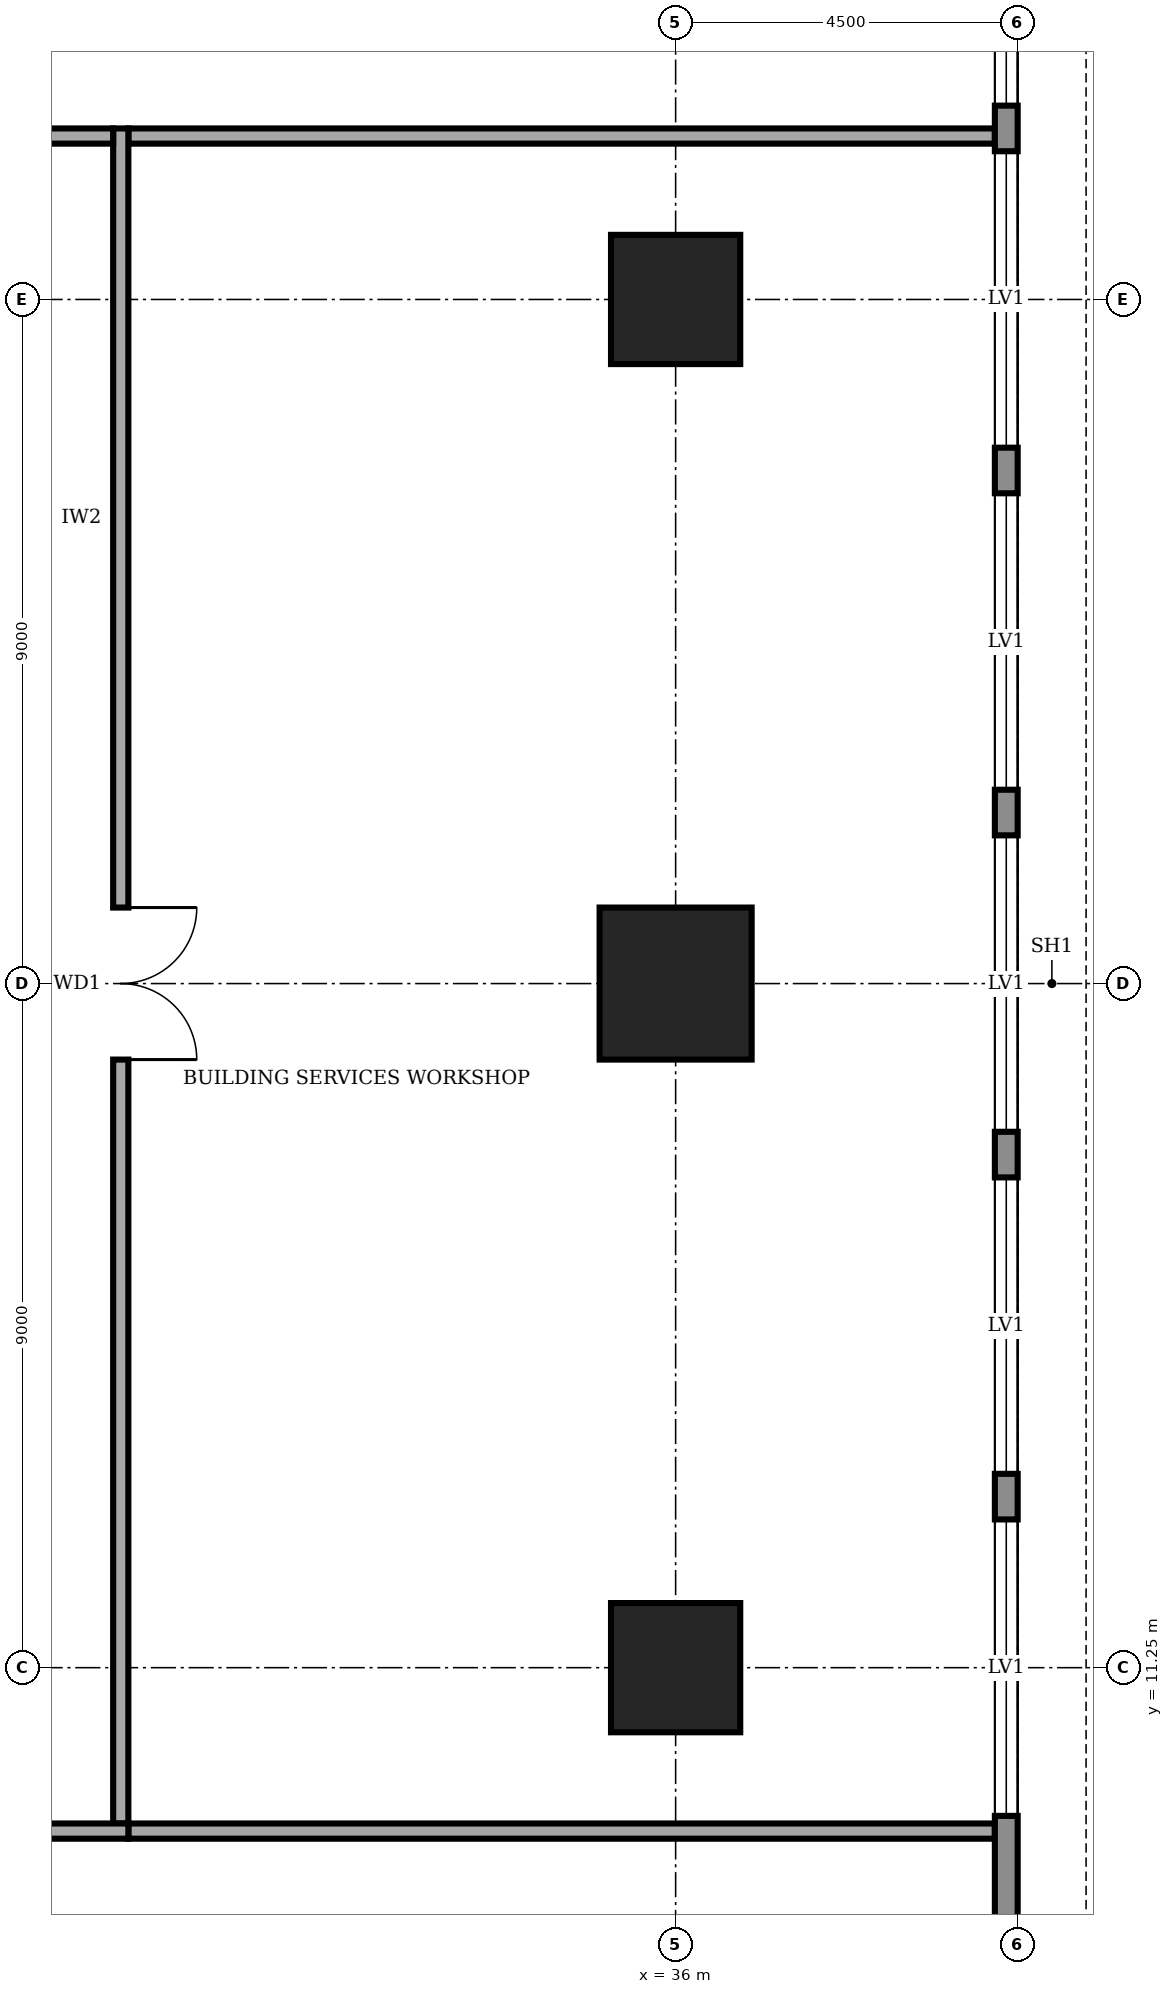
"""IFC4 building model, lengths in metres.
Left out: names, types, materials, properties, quantities, classifications, styles, units other than length and angle.
Written with IfcOpenShell. Run it as: python <this file> out.ifc"""

import sys

from ifc_helpers import new_model, si_unit, direction, frame, frame_2d, origin, origin_2d, place, context, subcontext, project, spatial, rectangle, extrude, element, fill, save


model = new_model("IFC4")
c1 = context("Model", 3, precision=1e-05, world=origin(), true_north=direction((0.0, 1.0)))
c2 = subcontext(c1, "Body", "Model", "MODEL_VIEW")
j1 = project(units=[si_unit("LENGTHUNIT", "METRE"), si_unit("PLANEANGLEUNIT", "RADIAN")], contexts=[c1])
p1 = place(None, origin())
s1 = spatial("IfcSite", under=j1, at=p1, CompositionType="ELEMENT")
p2 = place(p1, origin())
s2 = spatial("IfcBuilding", under=s1, at=p2, CompositionType="ELEMENT")
p3 = place(p2, frame((0.0, 0.0, 289.0)))
s3 = spatial("IfcBuildingStorey", under=s2, at=p3, CompositionType="ELEMENT", Elevation=289.0)
p4 = place(p3, frame((36.0, 11.25, 0.0), z_axis=(0.0, 0.0, 1.0), x_axis=(1.0, 0.0, 0.0)))
e1 = element("IfcColumn", 1, at=p4, inside=s3, PredefinedType="COLUMN", context=c2, shape_type="SweptSolid", body=[
    extrude(rectangle(XDim=1.7, YDim=1.7, at=origin_2d()), origin(), (0.0, 0.0, 1.0), 4.0),
])
p5 = place(p3, frame((36.0, 20.25, 0.0), z_axis=(0.0, 0.0, 1.0), x_axis=(1.0, 0.0, 0.0)))
e2 = element("IfcColumn", 2, at=p5, inside=s3, PredefinedType="COLUMN", context=c2, shape_type="SweptSolid", body=[
    extrude(rectangle(XDim=2.0, YDim=2.0, at=origin_2d()), origin(), (0.0, 0.0, 1.0), 4.0),
])
p6 = place(p3, frame((36.0, 29.25, 0.0), z_axis=(0.0, 0.0, 1.0), x_axis=(1.0, 0.0, 0.0)))
e3 = element("IfcColumn", 3, at=p6, inside=s3, PredefinedType="COLUMN", context=c2, shape_type="SweptSolid", body=[
    extrude(rectangle(XDim=1.7, YDim=1.7, at=origin_2d()), origin(), (0.0, 0.0, 1.0), 4.0),
])
p7 = place(p3, frame((40.35, 4.52, 0.0), z_axis=(0.0, 0.0, 1.0), x_axis=(0.0, 1.0, 0.0)))
e4 = element("IfcWall", 4, at=p7, inside=s3, PredefinedType="STANDARD", context=c2, shape_type="SweptSolid", body=[
    extrude(rectangle(XDim=31.46, YDim=0.3, at=frame_2d((15.73, 0.0))), origin(), (0.0, 0.0, 1.0), 3.75),
])
p8 = place(p7, frame((4.78, 0.0, 0.9)))
e5 = element("IfcOpeningElement", 5, at=p8, cuts=e4, PredefinedType="OPENING", context=c2, shape_type="SweptSolid", body=[
    extrude(rectangle(XDim=3.9, YDim=2.2, at=frame_2d((1.95, 1.1))), frame((0.0, 0.16, 0.0), z_axis=(0.0, -1.0, 0.0), x_axis=(1.0, 0.0, 0.0)), (0.0, 0.0, 1.0), 0.32),
])
p9 = place(p7, frame((9.28, 0.0, 0.9)))
e6 = element("IfcOpeningElement", 6, at=p9, cuts=e4, PredefinedType="OPENING", context=c2, shape_type="SweptSolid", body=[
    extrude(rectangle(XDim=3.9, YDim=2.2, at=frame_2d((1.95, 1.1))), frame((0.0, 0.16, 0.0), z_axis=(0.0, -1.0, 0.0), x_axis=(1.0, 0.0, 0.0)), (0.0, 0.0, 1.0), 0.32),
])
p10 = place(p7, frame((13.78, 0.0, 0.9)))
e7 = element("IfcOpeningElement", 7, at=p10, cuts=e4, PredefinedType="OPENING", context=c2, shape_type="SweptSolid", body=[
    extrude(rectangle(XDim=3.9, YDim=2.2, at=frame_2d((1.95, 1.1))), frame((0.0, 0.16, 0.0), z_axis=(0.0, -1.0, 0.0), x_axis=(1.0, 0.0, 0.0)), (0.0, 0.0, 1.0), 0.32),
])
p11 = place(p7, frame((18.28, 0.0, 0.9)))
e8 = element("IfcOpeningElement", 8, at=p11, cuts=e4, PredefinedType="OPENING", context=c2, shape_type="SweptSolid", body=[
    extrude(rectangle(XDim=3.9, YDim=2.2, at=frame_2d((1.95, 1.1))), frame((0.0, 0.16, 0.0), z_axis=(0.0, -1.0, 0.0), x_axis=(1.0, 0.0, 0.0)), (0.0, 0.0, 1.0), 0.32),
])
p12 = place(p7, frame((22.78, 0.0, 0.9)))
e9 = element("IfcOpeningElement", 9, at=p12, cuts=e4, PredefinedType="OPENING", context=c2, shape_type="SweptSolid", body=[
    extrude(rectangle(XDim=3.9, YDim=2.2, at=frame_2d((1.95, 1.1))), frame((0.0, 0.16, 0.0), z_axis=(0.0, -1.0, 0.0), x_axis=(1.0, 0.0, 0.0)), (0.0, 0.0, 1.0), 0.32),
])
p13 = place(p7, frame((27.28, 0.0, 0.9)))
e10 = element("IfcOpeningElement", 10, at=p13, cuts=e4, PredefinedType="OPENING", context=c2, shape_type="SweptSolid", body=[
    extrude(rectangle(XDim=3.9, YDim=2.2, at=frame_2d((1.95, 1.1))), frame((0.0, 0.16, 0.0), z_axis=(0.0, -1.0, 0.0), x_axis=(1.0, 0.0, 0.0)), (0.0, 0.0, 1.0), 0.32),
])
p14 = place(p3, frame((11.9, 9.1, 0.0), z_axis=(0.0, 0.0, 1.0), x_axis=(1.0, 0.0, 0.0)))
e11 = element("IfcWall", 11, at=p14, inside=s3, PredefinedType="SOLIDWALL", context=c2, shape_type="SweptSolid", body=[
    extrude(rectangle(XDim=16.9, YDim=0.2, at=frame_2d((8.45, 0.0))), origin(), (0.0, 0.0, 1.0), 3.75),
])
p15 = place(p14, frame((7.15, 0.0, 0.0)))
e12 = element("IfcOpeningElement", 12, at=p15, cuts=e11, PredefinedType="OPENING", context=c2, shape_type="SweptSolid", body=[
    extrude(rectangle(XDim=2.4, YDim=2.7, at=frame_2d((1.2, 1.35))), frame((0.0, 0.11, 0.0), z_axis=(0.0, -1.0, 0.0), x_axis=(1.0, 0.0, 0.0)), (0.0, 0.0, 1.0), 0.22),
])
p16 = place(p3, frame((28.7, 9.2, 0.0), z_axis=(0.0, 0.0, 1.0), x_axis=(0.0, 1.0, 0.0)))
e13 = element("IfcWall", 13, at=p16, inside=s3, PredefinedType="SOLIDWALL", context=c2, shape_type="SweptSolid", body=[
    extrude(rectangle(XDim=22.3, YDim=0.2, at=frame_2d((11.15, 0.0))), origin(), (0.0, 0.0, 1.0), 3.75),
])
p17 = place(p16, frame((10.05, 0.0, 0.0)))
e14 = element("IfcOpeningElement", 14, at=p17, cuts=e13, PredefinedType="OPENING", context=c2, shape_type="SweptSolid", body=[
    extrude(rectangle(XDim=2.0, YDim=2.1, at=frame_2d((1.0, 1.05))), frame((0.0, 0.11, 0.0), z_axis=(0.0, -1.0, 0.0), x_axis=(1.0, 0.0, 0.0)), (0.0, 0.0, 1.0), 0.22),
])
p18 = place(p3, frame((28.6, 31.4, 0.0), z_axis=(0.0, 0.0, 1.0), x_axis=(-1.0, 0.0, 0.0)))
e15 = element("IfcWall", 15, at=p18, inside=s3, PredefinedType="SOLIDWALL", context=c2, shape_type="SweptSolid", body=[
    extrude(rectangle(XDim=16.9, YDim=0.2, at=frame_2d((8.45, 0.0))), origin(), (0.0, 0.0, 1.0), 3.75),
])
p19 = place(p18, frame((12.55, 0.0, 0.0)))
e16 = element("IfcOpeningElement", 16, at=p19, cuts=e15, PredefinedType="OPENING", context=c2, shape_type="SweptSolid", body=[
    extrude(rectangle(XDim=2.4, YDim=2.7, at=frame_2d((1.2, 1.35))), frame((0.0, 0.11, 0.0), z_axis=(0.0, -1.0, 0.0), x_axis=(1.0, 0.0, 0.0)), (0.0, 0.0, 1.0), 0.22),
])
p20 = place(p18, frame((4.3, 0.0, 0.0)))
e17 = element("IfcOpeningElement", 17, at=p20, cuts=e15, PredefinedType="OPENING", context=c2, shape_type="SweptSolid", body=[
    extrude(rectangle(XDim=1.8, YDim=2.1, at=frame_2d((0.9, 1.05))), frame((0.0, 0.11, 0.0), z_axis=(0.0, -1.0, 0.0), x_axis=(1.0, 0.0, 0.0)), (0.0, 0.0, 1.0), 0.22),
])
for number, where, z_axis, x_axis in (
    (18, (28.8, 9.1, 0.0), (0.0, 0.0, 1.0), (1.0, 0.0, 0.0)),
    (19, (28.8, 31.4, 0.0), (0.0, 0.0, 1.0), (1.0, 0.0, 0.0)),
):
    element("IfcWall", number, at=place(p3, frame(where, z_axis=z_axis, x_axis=x_axis)), inside=s3, PredefinedType="SOLIDWALL", context=c2, shape_type="SweptSolid", body=[
        extrude(rectangle(XDim=11.4, YDim=0.2, at=frame_2d((5.7, 0.0))), origin(), (0.0, 0.0, 1.0), 3.75),
    ])
p21 = place(p8, origin())
e20 = element("IfcWindow", 20, at=p21, inside=s3, PartitioningType="SINGLE_PANEL", PredefinedType="WINDOW", context=c2, shape_type="SweptSolid", body=[
    extrude(rectangle(XDim=3.9, YDim=2.2, at=frame_2d((1.95, 1.1))), frame((0.0, 0.03, 0.0), z_axis=(0.0, -1.0, 0.0), x_axis=(1.0, 0.0, 0.0)), (0.0, 0.0, 1.0), 0.06),
])
fill(e5, e20)
p22 = place(p9, origin())
e21 = element("IfcWindow", 21, at=p22, inside=s3, PartitioningType="SINGLE_PANEL", PredefinedType="WINDOW", context=c2, shape_type="SweptSolid", body=[
    extrude(rectangle(XDim=3.9, YDim=2.2, at=frame_2d((1.95, 1.1))), frame((0.0, 0.03, 0.0), z_axis=(0.0, -1.0, 0.0), x_axis=(1.0, 0.0, 0.0)), (0.0, 0.0, 1.0), 0.06),
])
fill(e6, e21)
p23 = place(p10, origin())
e22 = element("IfcWindow", 22, at=p23, inside=s3, PartitioningType="SINGLE_PANEL", PredefinedType="WINDOW", context=c2, shape_type="SweptSolid", body=[
    extrude(rectangle(XDim=3.9, YDim=2.2, at=frame_2d((1.95, 1.1))), frame((0.0, 0.03, 0.0), z_axis=(0.0, -1.0, 0.0), x_axis=(1.0, 0.0, 0.0)), (0.0, 0.0, 1.0), 0.06),
])
fill(e7, e22)
p24 = place(p11, origin())
e23 = element("IfcWindow", 23, at=p24, inside=s3, PartitioningType="SINGLE_PANEL", PredefinedType="WINDOW", context=c2, shape_type="SweptSolid", body=[
    extrude(rectangle(XDim=3.9, YDim=2.2, at=frame_2d((1.95, 1.1))), frame((0.0, 0.03, 0.0), z_axis=(0.0, -1.0, 0.0), x_axis=(1.0, 0.0, 0.0)), (0.0, 0.0, 1.0), 0.06),
])
fill(e8, e23)
p25 = place(p12, origin())
e24 = element("IfcWindow", 24, at=p25, inside=s3, PartitioningType="SINGLE_PANEL", PredefinedType="WINDOW", context=c2, shape_type="SweptSolid", body=[
    extrude(rectangle(XDim=3.9, YDim=2.2, at=frame_2d((1.95, 1.1))), frame((0.0, 0.03, 0.0), z_axis=(0.0, -1.0, 0.0), x_axis=(1.0, 0.0, 0.0)), (0.0, 0.0, 1.0), 0.06),
])
fill(e9, e24)
p26 = place(p13, origin())
e25 = element("IfcWindow", 25, at=p26, inside=s3, PartitioningType="SINGLE_PANEL", PredefinedType="WINDOW", context=c2, shape_type="SweptSolid", body=[
    extrude(rectangle(XDim=3.9, YDim=2.2, at=frame_2d((1.95, 1.1))), frame((0.0, 0.03, 0.0), z_axis=(0.0, -1.0, 0.0), x_axis=(1.0, 0.0, 0.0)), (0.0, 0.0, 1.0), 0.06),
])
fill(e10, e25)
p27 = place(p17, frame((2.0, 0.0, 0.0), z_axis=(0.0, 0.0, 1.0), x_axis=(-1.0, 0.0, 0.0)))
e26 = element("IfcDoor", 26, at=p27, inside=s3, OperationType="DOUBLE_DOOR_SINGLE_SWING", PredefinedType="DOOR", context=c2, shape_type="SweptSolid", body=[
    extrude(rectangle(XDim=2.0, YDim=2.1, at=frame_2d((1.0, 1.05))), frame((0.0, 0.025, 0.0), z_axis=(0.0, -1.0, 0.0), x_axis=(1.0, 0.0, 0.0)), (0.0, 0.0, 1.0), 0.05),
])
fill(e14, e26)
save(model, sys.argv[1])
